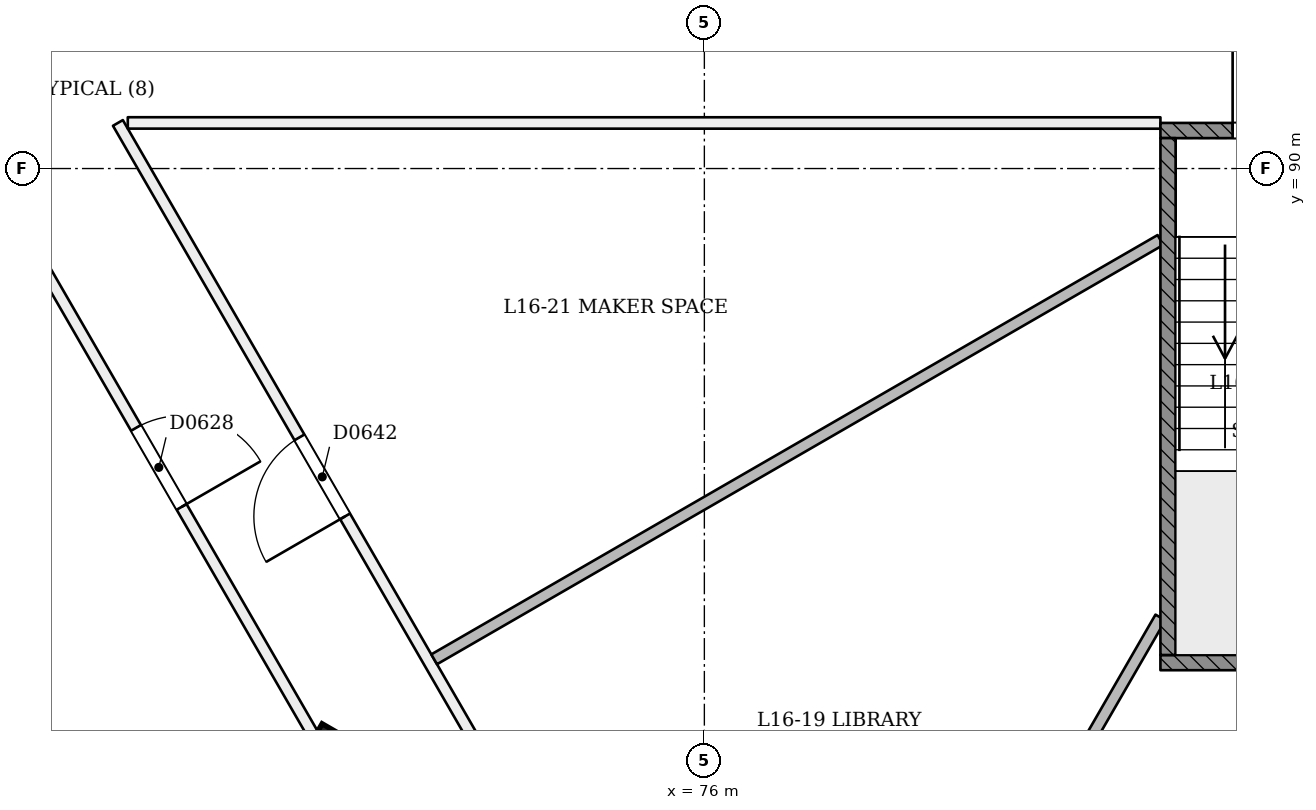
"""IFC4 building model, lengths in metres.
Left out: names, types, materials, properties, quantities, classifications, styles, units other than length and angle.
Written with IfcOpenShell. Run it as: python <this file> out.ifc"""

import sys

from ifc_helpers import new_model, si_unit, direction, frame, frame_2d, origin, origin_2d, place, context, subcontext, project, spatial, rectangle, extrude, element, fill, save


model = new_model("IFC4")
c1 = context("Model", 3, precision=1e-05, world=origin(), true_north=direction((0.0, 1.0)))
c2 = subcontext(c1, "Body", "Model", "MODEL_VIEW")
j1 = project(units=[si_unit("LENGTHUNIT", "METRE"), si_unit("PLANEANGLEUNIT", "RADIAN")], contexts=[c1])
p1 = place(None, origin())
s1 = spatial("IfcSite", under=j1, at=p1, CompositionType="ELEMENT")
p2 = place(p1, origin())
s2 = spatial("IfcBuilding", under=s1, at=p2, CompositionType="ELEMENT")
p3 = place(p2, frame((0.0, 0.0, 66.6)))
s3 = spatial("IfcBuildingStorey", under=s2, at=p3, CompositionType="ELEMENT", Elevation=66.6)
p4 = place(p3, frame((71.072, 82.17, -0.021), z_axis=(0.022222910879, 0.038415824599, 0.999014697916), x_axis=(-0.866025559342, -0.498520326662, 0.038434547893)))
e1 = element("IfcColumn", 1, at=p4, inside=s3, PredefinedType="COLUMN", context=c2, shape_type="SweptSolid", body=[
    extrude(rectangle(XDim=0.7, YDim=0.7, at=origin_2d()), origin(), (0.0, 0.0, 1.0), 3.604),
])
p5 = place(p3, frame((62.458, 97.093, 0.0), z_axis=(0.0, 0.0, 1.0), x_axis=(0.499998802074, -0.866026095406, 0.0)))
e2 = element("IfcWall", 2, at=p5, inside=s3, PredefinedType="PARTITIONING", context=c2, shape_type="SweptSolid", body=[
    extrude(rectangle(XDim=43.437, YDim=0.15, at=frame_2d((21.719, 0.0))), origin(), (0.0, 0.0, 1.0), 2.7),
])
p6 = place(p5, frame((0.286, 0.0, 0.0)))
e3 = element("IfcOpeningElement", 3, at=p6, cuts=e2, PredefinedType="OPENING", context=c2, shape_type="SweptSolid", body=[
    extrude(rectangle(XDim=1.2, YDim=2.1, at=frame_2d((0.6, 1.05))), frame((0.0, 0.085, 0.0), z_axis=(0.0, -1.0, 0.0), x_axis=(1.0, 0.0, 0.0)), (0.0, 0.0, 1.0), 0.171),
])
p7 = place(p5, frame((12.13, 0.0, 0.0)))
e4 = element("IfcOpeningElement", 4, at=p7, cuts=e2, PredefinedType="OPENING", context=c2, shape_type="SweptSolid", body=[
    extrude(rectangle(XDim=1.2, YDim=2.1, at=frame_2d((0.6, 1.05))), frame((0.0, 0.085, 0.0), z_axis=(0.0, -1.0, 0.0), x_axis=(1.0, 0.0, 0.0)), (0.0, 0.0, 1.0), 0.171),
])
p8 = place(p5, frame((18.98, 0.0, 0.0)))
e5 = element("IfcOpeningElement", 5, at=p8, cuts=e2, PredefinedType="OPENING", context=c2, shape_type="SweptSolid", body=[
    extrude(rectangle(XDim=1.0, YDim=2.1, at=frame_2d((0.5, 1.05))), frame((0.0, 0.085, 0.0), z_axis=(0.0, -1.0, 0.0), x_axis=(1.0, 0.0, 0.0)), (0.0, 0.0, 1.0), 0.171),
])
p9 = place(p5, frame((27.88, 0.0, 0.0)))
e6 = element("IfcOpeningElement", 6, at=p9, cuts=e2, PredefinedType="OPENING", context=c2, shape_type="SweptSolid", body=[
    extrude(rectangle(XDim=1.2, YDim=2.1, at=frame_2d((0.6, 1.05))), frame((0.0, 0.085, 0.0), z_axis=(0.0, -1.0, 0.0), x_axis=(1.0, 0.0, 0.0)), (0.0, 0.0, 1.0), 0.171),
])
p10 = place(p5, frame((38.745, 0.0, 0.0)))
e7 = element("IfcOpeningElement", 7, at=p10, cuts=e2, PredefinedType="OPENING", context=c2, shape_type="SweptSolid", body=[
    extrude(rectangle(XDim=1.2, YDim=2.1, at=frame_2d((0.6, 1.05))), frame((0.0, 0.085, 0.0), z_axis=(0.0, -1.0, 0.0), x_axis=(1.0, 0.0, 0.0)), (0.0, 0.0, 1.0), 0.171),
])
p11 = place(p3, frame((85.0, 61.648, 0.0), z_axis=(0.0, 0.0, 1.0), x_axis=(-0.499995543135, 0.866027976941, 0.0)))
e8 = element("IfcWall", 8, at=p11, inside=s3, PredefinedType="PARTITIONING", context=c2, shape_type="SweptSolid", body=[
    extrude(rectangle(XDim=33.431, YDim=0.15, at=frame_2d((16.715, 0.0))), origin(), (0.0, 0.0, 1.0), 3.1),
])
p12 = place(p11, frame((5.719, 0.0, 0.0)))
e9 = element("IfcOpeningElement", 9, at=p12, cuts=e8, PredefinedType="OPENING", context=c2, shape_type="SweptSolid", body=[
    extrude(rectangle(XDim=1.2, YDim=2.1, at=frame_2d((0.6, 1.05))), frame((0.0, 0.085, 0.0), z_axis=(0.0, -1.0, 0.0), x_axis=(1.0, 0.0, 0.0)), (0.0, 0.0, 1.0), 0.171),
])
p13 = place(p11, frame((21.269, 0.0, 0.0)))
e10 = element("IfcOpeningElement", 10, at=p13, cuts=e8, PredefinedType="OPENING", context=c2, shape_type="SweptSolid", body=[
    extrude(rectangle(XDim=1.2, YDim=2.1, at=frame_2d((0.6, 1.05))), frame((0.0, 0.085, 0.0), z_axis=(0.0, -1.0, 0.0), x_axis=(1.0, 0.0, 0.0)), (0.0, 0.0, 1.0), 0.171),
])
p14 = place(p11, frame((27.454, 0.0, 0.0)))
e11 = element("IfcOpeningElement", 11, at=p14, cuts=e8, PredefinedType="OPENING", context=c2, shape_type="SweptSolid", body=[
    extrude(rectangle(XDim=1.2, YDim=2.1, at=frame_2d((0.6, 1.05))), frame((0.0, 0.085, 0.0), z_axis=(0.0, -1.0, 0.0), x_axis=(1.0, 0.0, 0.0)), (0.0, 0.0, 1.0), 0.171),
])
p15 = place(p11, frame((12.513, 0.0, 0.0)))
e12 = element("IfcOpeningElement", 12, at=p15, cuts=e8, PredefinedType="OPENING", context=c2, shape_type="SweptSolid", body=[
    extrude(rectangle(XDim=1.2, YDim=2.1, at=frame_2d((0.6, 1.05))), frame((0.0, 0.085, 0.0), z_axis=(0.0, -1.0, 0.0), x_axis=(1.0, 0.0, 0.0)), (0.0, 0.0, 1.0), 0.171),
])
p16 = place(p3, frame((68.415, 90.6, 0.0), z_axis=(0.0, 0.0, 1.0), x_axis=(0.999999997416, -7.1882974e-05, 0.0)))
e13 = element("IfcWall", 13, at=p16, inside=s3, PredefinedType="PARTITIONING", context=c2, shape_type="SweptSolid", body=[
    extrude(rectangle(XDim=13.585, YDim=0.15, at=frame_2d((6.793, 0.0))), origin(), (0.0, 0.0, 1.0), 3.1),
])
p17 = place(p3, frame((82.0, 84.094, 0.0), z_axis=(0.0, 0.0, 1.0), x_axis=(-0.500007457698, -0.866021098038, 0.0)))
e14 = element("IfcWall", 14, at=p17, inside=s3, PredefinedType="PARTITIONING", context=c2, shape_type="SweptSolid", body=[
    extrude(rectangle(XDim=4.894, YDim=0.15, at=frame_2d((2.447, 0.0))), origin(), (0.0, 0.0, 1.0), 3.1),
])
p18 = place(p3, frame((82.0, 89.06, 0.0), z_axis=(0.0, 0.0, 1.0), x_axis=(-0.866027129831, -0.499997010388, 0.0)))
e15 = element("IfcWall", 15, at=p18, inside=s3, PredefinedType="PARTITIONING", context=c2, shape_type="SweptSolid", body=[
    extrude(rectangle(XDim=11.033, YDim=0.15, at=frame_2d((5.516, 0.0))), origin(), (0.0, 0.0, 1.0), 3.1),
])
p19 = place(p3, frame((82.0, 90.5, 0.0), z_axis=(0.0, 0.0, 1.0), x_axis=(1.0, 0.0, 0.0)))
e16 = element("IfcWall", 16, at=p19, inside=s3, PredefinedType="SOLIDWALL", context=c2, shape_type="SweptSolid", body=[
    extrude(rectangle(XDim=6.0, YDim=0.2, at=frame_2d((3.0, 0.0))), origin(), (0.0, 0.0, 1.0), 3.1),
])
p20 = place(p19, frame((0.95, 0.0, 0.0)))
e17 = element("IfcOpeningElement", 17, at=p20, cuts=e16, PredefinedType="OPENING", context=c2, shape_type="SweptSolid", body=[
    extrude(rectangle(XDim=1.2, YDim=2.1, at=frame_2d((0.6, 1.05))), frame((0.0, 0.11, 0.0), z_axis=(0.0, -1.0, 0.0), x_axis=(1.0, 0.0, 0.0)), (0.0, 0.0, 1.0), 0.221),
])
p21 = place(p19, frame((3.85, 0.0, 0.0)))
e18 = element("IfcOpeningElement", 18, at=p21, cuts=e16, PredefinedType="OPENING", context=c2, shape_type="SweptSolid", body=[
    extrude(rectangle(XDim=1.2, YDim=2.1, at=frame_2d((0.6, 1.05))), frame((0.0, 0.11, 0.0), z_axis=(0.0, -1.0, 0.0), x_axis=(1.0, 0.0, 0.0)), (0.0, 0.0, 1.0), 0.221),
])
p22 = place(p3, frame((82.0, 83.5, 0.0), z_axis=(0.0, 0.0, 1.0), x_axis=(1.0, 0.0, 0.0)))
e19 = element("IfcWall", 19, at=p22, inside=s3, PredefinedType="SOLIDWALL", context=c2, shape_type="SweptSolid", body=[
    extrude(rectangle(XDim=6.0, YDim=0.2, at=frame_2d((3.0, 0.0))), origin(), (0.0, 0.0, 1.0), 3.1),
])
p23 = place(p3, frame((82.1, 83.6, 0.0), z_axis=(0.0, 0.0, 1.0), x_axis=(0.0, 1.0, 0.0)))
e20 = element("IfcWall", 20, at=p23, inside=s3, PredefinedType="SOLIDWALL", context=c2, shape_type="SweptSolid", body=[
    extrude(rectangle(XDim=6.8, YDim=0.2, at=frame_2d((3.4, 0.0))), origin(), (0.0, 0.0, 1.0), 3.1),
])
p24 = place(p7, origin())
e21 = element("IfcDoor", 21, at=p24, inside=s3, OperationType="SINGLE_SWING_RIGHT", PredefinedType="NOTDEFINED", context=c2, shape_type="SweptSolid", body=[
    extrude(rectangle(XDim=1.2, YDim=2.1, at=frame_2d((0.6, 1.05))), frame((0.0, 0.025, 0.0), z_axis=(0.0, -1.0, 0.0), x_axis=(1.0, 0.0, 0.0)), (0.0, 0.0, 1.0), 0.05),
])
fill(e4, e21)
p25 = place(p14, origin())
e22 = element("IfcDoor", 22, at=p25, inside=s3, OperationType="SINGLE_SWING_LEFT", PredefinedType="NOTDEFINED", context=c2, shape_type="SweptSolid", body=[
    extrude(rectangle(XDim=1.2, YDim=2.1, at=frame_2d((0.6, 1.05))), frame((0.0, 0.025, 0.0), z_axis=(0.0, -1.0, 0.0), x_axis=(1.0, 0.0, 0.0)), (0.0, 0.0, 1.0), 0.05),
])
fill(e11, e22)
p26 = place(p20, origin())
e23 = element("IfcDoor", 23, at=p26, inside=s3, OperationType="SINGLE_SWING_LEFT", PredefinedType="NOTDEFINED", context=c2, shape_type="SweptSolid", body=[
    extrude(rectangle(XDim=1.2, YDim=2.1, at=frame_2d((0.6, 1.05))), frame((0.0, 0.025, 0.0), z_axis=(0.0, -1.0, 0.0), x_axis=(1.0, 0.0, 0.0)), (0.0, 0.0, 1.0), 0.05),
])
fill(e17, e23)
save(model, sys.argv[1])
